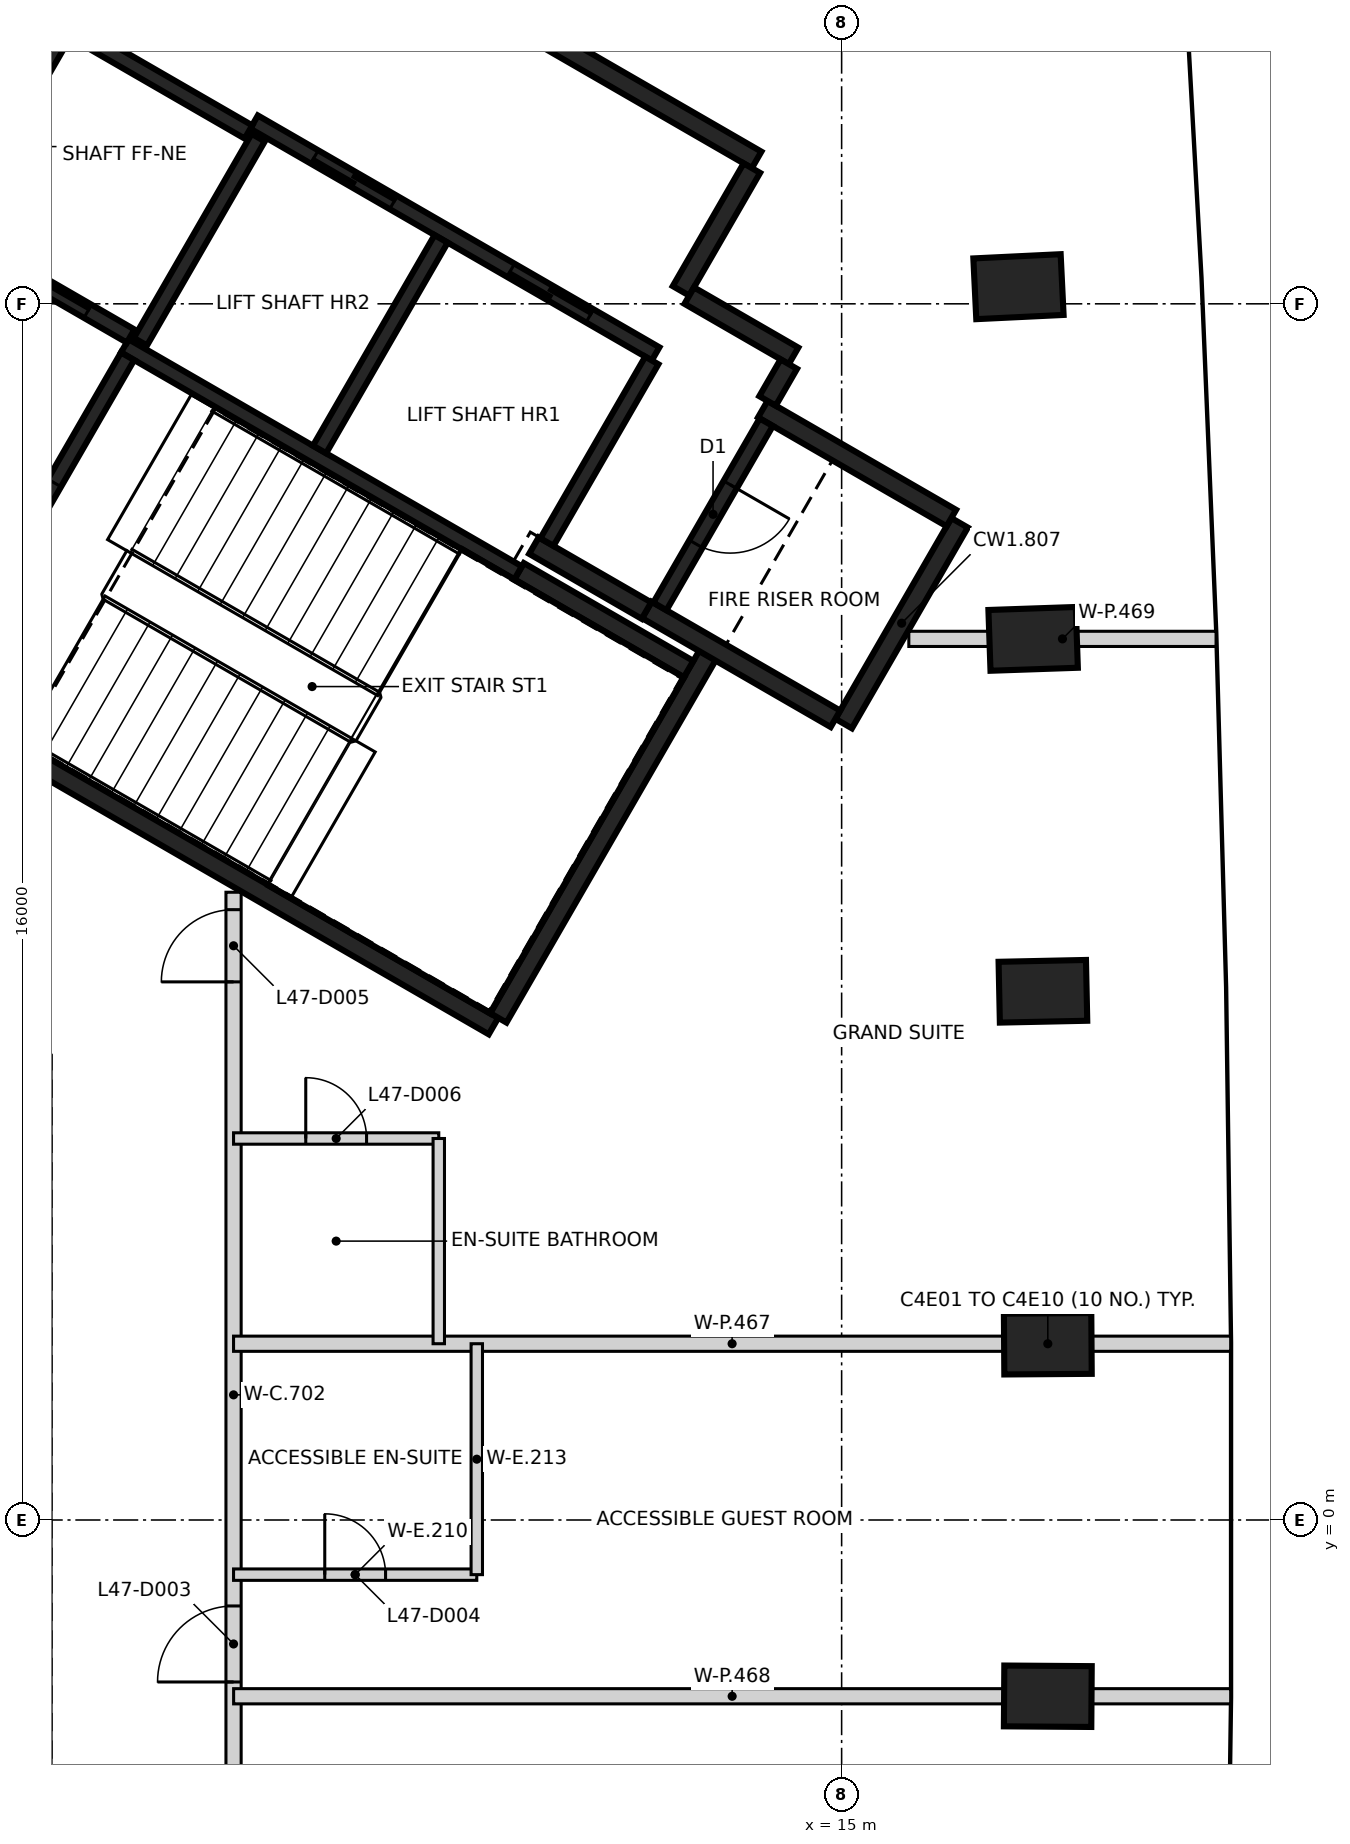
"""IFC4 building model, lengths in metres.
Left out: names, types, materials, properties, quantities, classifications, styles, units other than length and angle.
Written with IfcOpenShell. Run it as: python <this file> out.ifc"""

import sys

from ifc_helpers import new_model, si_unit, direction, frame, frame_2d, origin, origin_2d, place, context, subcontext, project, spatial, rectangle, extrude, element, fill, save


model = new_model("IFC4")
c1 = context("Model", 3, precision=1e-05, world=origin(), true_north=direction((0.0, 1.0)))
c2 = subcontext(c1, "Body", "Model", "MODEL_VIEW")
j1 = project(units=[si_unit("LENGTHUNIT", "METRE"), si_unit("PLANEANGLEUNIT", "RADIAN")], contexts=[c1])
p1 = place(None, origin())
s1 = spatial("IfcSite", under=j1, at=p1, CompositionType="ELEMENT")
p2 = place(p1, origin())
s2 = spatial("IfcBuilding", under=s1, at=p2, CompositionType="ELEMENT")
p3 = place(p2, frame((0.0, 0.0, 190.0)))
s3 = spatial("IfcBuildingStorey", under=s2, at=p3, CompositionType="ELEMENT", Elevation=190.0)
for number, where, z_axis, x_axis in (
    (1, (17.712, -2.319, -0.35), (0.0, 0.0, 1.0), (-1.0, 0.007, 0.0)),
    (2, (17.712, 2.319, -0.35), (0.0, 0.0, 1.0), (1.0, 0.007, 0.0)),
    (3, (17.648, 6.956, -0.35), (0.0, 0.0, 1.0), (1.0, 0.021, 0.0)),
    (4, (17.519, 11.592, -0.35), (0.0, 0.0, 1.0), (0.999, 0.034, 0.0)),
    (5, (17.326, 16.226, -0.35), (0.0, 0.0, 1.0), (0.999, 0.048, 0.0)),
):
    element("IfcColumn", number, at=place(p3, frame(where, z_axis=z_axis, x_axis=x_axis)), inside=s3, PredefinedType="COLUMN", context=c2, shape_type="SweptSolid", body=[
        extrude(rectangle(XDim=1.15, YDim=0.8, at=origin_2d()), origin(), (0.0, 0.0, 1.0), 3.6),
    ])
p4 = place(p3, frame((10.42, 6.498, 0.0), z_axis=(0.0, 0.0, 1.0), x_axis=(-0.866021906294, 0.500006057782, 0.0)))
e6 = element("IfcWall", 6, at=p4, inside=s3, PredefinedType="SHEAR", context=c2, shape_type="SweptSolid", body=[
    extrude(rectangle(XDim=11.55, YDim=0.25, at=frame_2d((5.775, 0.0))), origin(), (0.0, 0.0, 1.0), 3.25),
])
p5 = place(p4, frame((10.025, 0.0, 0.0)))
e7 = element("IfcOpeningElement", 7, at=p5, cuts=e6, PredefinedType="OPENING", context=c2, shape_type="SweptSolid", body=[
    extrude(rectangle(XDim=1.2, YDim=2.1, at=frame_2d((0.6, 1.05))), frame((0.0, 0.135, 0.0), z_axis=(0.0, -1.0, 0.0), x_axis=(1.0, 0.0, 0.0)), (0.0, 0.0, 1.0), 0.27),
])
p6 = place(p4, frame((8.725, 0.0, 0.0)))
e8 = element("IfcOpeningElement", 8, at=p6, cuts=e6, PredefinedType="OPENING", context=c2, shape_type="SweptSolid", body=[
    extrude(rectangle(XDim=1.2, YDim=2.1, at=frame_2d((0.6, 1.05))), frame((0.0, 0.135, 0.0), z_axis=(0.0, -1.0, 0.0), x_axis=(1.0, 0.0, 0.0)), (0.0, 0.0, 1.0), 0.27),
])
p7 = place(p3, frame((6.304, 22.269, 0.0), z_axis=(0.0, 0.0, 1.0), x_axis=(0.866022959057, -0.500004234368, 0.0)))
e9 = element("IfcWall", 9, at=p7, inside=s3, PredefinedType="SHEAR", context=c2, shape_type="SweptSolid", body=[
    extrude(rectangle(XDim=8.75, YDim=0.25, at=frame_2d((4.375, 0.0))), origin(), (0.0, 0.0, 1.0), 3.25),
])
p8 = place(p3, frame((3.179, 16.856, 0.0), z_axis=(0.0, 0.0, 1.0), x_axis=(0.500001955336, 0.866024274868, 0.0)))
e10 = element("IfcWall", 10, at=p8, inside=s3, PredefinedType="SHEAR", context=c2, shape_type="SweptSolid", body=[
    extrude(rectangle(XDim=6.125, YDim=0.25, at=frame_2d((3.062, 0.0))), origin(), (0.0, 0.0, 1.0), 3.25),
])
p9 = place(p8, frame((3.563, 0.0, 0.0)))
e11 = element("IfcOpeningElement", 11, at=p9, cuts=e10, PredefinedType="OPENING", context=c2, shape_type="SweptSolid", body=[
    extrude(rectangle(XDim=1.0, YDim=2.1, at=frame_2d((0.5, 1.05))), frame((0.0, 0.135, 0.0), z_axis=(0.0, -1.0, 0.0), x_axis=(1.0, 0.0, 0.0)), (0.0, 0.0, 1.0), 0.27),
])
p10 = place(p3, frame((13.238, 11.378, 0.0), z_axis=(0.0, 0.0, 1.0), x_axis=(-0.500008851346, -0.866020293397, 0.0)))
e12 = element("IfcWall", 12, at=p10, inside=s3, PredefinedType="SHEAR", context=c2, shape_type="SweptSolid", body=[
    extrude(rectangle(XDim=5.51, YDim=0.25, at=frame_2d((2.755, 0.0))), origin(), (0.0, 0.0, 1.0), 3.25),
])
p11 = place(p3, frame((16.552, 13.119, 0.0), z_axis=(0.0, 0.0, 1.0), x_axis=(-0.499978833458, -0.866037623948, 0.0)))
e13 = element("IfcWall", 13, at=p11, inside=s3, PredefinedType="SHEAR", context=c2, shape_type="SweptSolid", body=[
    extrude(rectangle(XDim=3.05, YDim=0.25, at=frame_2d((1.525, 0.0))), origin(), (0.0, 0.0, 1.0), 3.25),
])
p12 = place(p3, frame((14.918, 10.54, 0.0), z_axis=(0.0, 0.0, 1.0), x_axis=(-0.866063538972, 0.499933942099, 0.0)))
e14 = element("IfcWall", 14, at=p12, inside=s3, PredefinedType="SHEAR", context=c2, shape_type="SweptSolid", body=[
    extrude(rectangle(XDim=2.865, YDim=0.25, at=frame_2d((1.432, 0.0))), origin(), (0.0, 0.0, 1.0), 3.25),
])
p13 = place(p3, frame((13.963, 14.614, 0.0), z_axis=(0.0, 0.0, 1.0), x_axis=(0.866042235819, -0.499970844928, 0.0)))
e15 = element("IfcWall", 15, at=p13, inside=s3, PredefinedType="SHEAR", context=c2, shape_type="SweptSolid", body=[
    extrude(rectangle(XDim=2.865, YDim=0.25, at=frame_2d((1.432, 0.0))), origin(), (0.0, 0.0, 1.0), 3.25),
])
p14 = place(p3, frame((10.757, 12.481, 0.0), z_axis=(0.0, 0.0, 1.0), x_axis=(0.866022940537, -0.500004266446, 0.0)))
e16 = element("IfcWall", 16, at=p14, inside=s3, PredefinedType="SHEAR", context=c2, shape_type="SweptSolid", body=[
    extrude(rectangle(XDim=2.575, YDim=0.25, at=frame_2d((1.287, 0.0))), origin(), (0.0, 0.0, 1.0), 3.25),
])
p15 = place(p3, frame((13.819, 17.785, 0.0), z_axis=(0.0, 0.0, 1.0), x_axis=(-0.500039802285, -0.866002422705, 0.0)))
e17 = element("IfcWall", 17, at=p15, inside=s3, PredefinedType="SHEAR", context=c2, shape_type="SweptSolid", body=[
    extrude(rectangle(XDim=1.865, YDim=0.25, at=frame_2d((0.932, 0.0))), origin(), (0.0, 0.0, 1.0), 3.25),
])
p16 = place(p3, frame((12.433, 11.964, 0.0), z_axis=(0.0, 0.0, 1.0), x_axis=(-0.866038183914, 0.499977863513, 0.0)))
e18 = element("IfcWall", 18, at=p16, inside=s3, PredefinedType="SHEAR", context=c2, shape_type="SweptSolid", body=[
    extrude(rectangle(XDim=1.71, YDim=0.25, at=frame_2d((0.855, 0.0))), origin(), (0.0, 0.0, 1.0), 3.25),
])
p17 = place(p3, frame((12.995, 16.108, 0.0), z_axis=(0.0, 0.0, 1.0), x_axis=(0.866044474677, -0.49996696679, 0.0)))
e19 = element("IfcWall", 19, at=p17, inside=s3, PredefinedType="SHEAR", context=c2, shape_type="SweptSolid", body=[
    extrude(rectangle(XDim=1.584, YDim=0.25, at=frame_2d((0.792, 0.0))), origin(), (0.0, 0.0, 1.0), 3.25),
])
p18 = place(p3, frame((14.305, 15.207, 0.0), z_axis=(0.0, 0.0, 1.0), x_axis=(-0.499848422343, -0.866112899501, 0.0)))
e20 = element("IfcWall", 20, at=p18, inside=s3, PredefinedType="SHEAR", context=c2, shape_type="SweptSolid", body=[
    extrude(rectangle(XDim=0.559, YDim=0.25, at=frame_2d((0.28, 0.0))), origin(), (0.0, 0.0, 1.0), 3.25),
])
p19 = place(p3, frame((12.552, 15.342, 0.0), z_axis=(0.0, 0.0, 1.0), x_axis=(-0.866030299012, 0.499991521122, 0.0)))
e21 = element("IfcWall", 21, at=p19, inside=s3, PredefinedType="SHEAR", context=c2, shape_type="SweptSolid", body=[
    extrude(rectangle(XDim=6.1, YDim=0.2, at=frame_2d((3.05, 0.0))), origin(), (0.0, 0.0, 1.0), 3.25),
])
p20 = place(p19, frame((1.0, 0.0, 0.0)))
e22 = element("IfcOpeningElement", 22, at=p20, cuts=e21, PredefinedType="OPENING", context=c2, shape_type="SweptSolid", body=[
    extrude(rectangle(XDim=1.2, YDim=2.1, at=frame_2d((0.6, 1.05))), frame((0.0, 0.11, 0.0), z_axis=(0.0, -1.0, 0.0), x_axis=(1.0, 0.0, 0.0)), (0.0, 0.0, 1.0), 0.22),
])
p21 = place(p19, frame((3.982, 0.0, 0.0)))
e23 = element("IfcOpeningElement", 23, at=p21, cuts=e21, PredefinedType="OPENING", context=c2, shape_type="SweptSolid", body=[
    extrude(rectangle(XDim=1.2, YDim=2.1, at=frame_2d((0.6, 1.05))), frame((0.0, 0.11, 0.0), z_axis=(0.0, -1.0, 0.0), x_axis=(1.0, 0.0, 0.0)), (0.0, 0.0, 1.0), 0.22),
])
p22 = place(p3, frame((10.743, 12.46, 0.0), z_axis=(0.0, 0.0, 1.0), x_axis=(-0.866018848283, 0.500011354289, 0.0)))
e24 = element("IfcWall", 24, at=p22, inside=s3, PredefinedType="SHEAR", context=c2, shape_type="SweptSolid", body=[
    extrude(rectangle(XDim=5.974, YDim=0.2, at=frame_2d((2.987, 0.0))), origin(), (0.0, 0.0, 1.0), 3.25),
])
p23 = place(p3, frame((3.057, 10.895, 0.0), z_axis=(0.0, 0.0, 1.0), x_axis=(0.500027839223, 0.866009330205, 0.0)))
e25 = element("IfcWall", 25, at=p23, inside=s3, PredefinedType="SHEAR", context=c2, shape_type="SweptSolid", body=[
    extrude(rectangle(XDim=5.098, YDim=0.2, at=frame_2d((2.549, 0.0))), origin(), (0.0, 0.0, 1.0), 3.25),
])
p24 = place(p23, frame((1.774, 0.0, 0.0)))
e26 = element("IfcOpeningElement", 26, at=p24, cuts=e25, PredefinedType="OPENING", context=c2, shape_type="SweptSolid", body=[
    extrude(rectangle(XDim=1.4, YDim=2.1, at=frame_2d((0.7, 1.05))), frame((0.0, 0.11, 0.0), z_axis=(0.0, -1.0, 0.0), x_axis=(1.0, 0.0, 0.0)), (0.0, 0.0, 1.0), 0.22),
])
p25 = place(p3, frame((8.132, 14.084, 0.0), z_axis=(0.0, 0.0, 1.0), x_axis=(0.500030834389, 0.86600760081, 0.0)))
e27 = element("IfcWall", 27, at=p25, inside=s3, PredefinedType="SHEAR", context=c2, shape_type="SweptSolid", body=[
    extrude(rectangle(XDim=3.198, YDim=0.2, at=frame_2d((1.599, 0.0))), origin(), (0.0, 0.0, 1.0), 3.25),
])
p26 = place(p3, frame((14.008, 14.442, 0.0), z_axis=(0.0, 0.0, 1.0), x_axis=(-0.499986818241, -0.866033014143, 0.0)))
e28 = element("IfcWall", 28, at=p26, inside=s3, PredefinedType="SHEAR", context=c2, shape_type="SweptSolid", body=[
    extrude(rectangle(XDim=2.798, YDim=0.2, at=frame_2d((1.399, 0.0))), origin(), (0.0, 0.0, 1.0), 3.25),
])
p27 = place(p26, frame((0.949, 0.0, 0.0)))
e29 = element("IfcOpeningElement", 29, at=p27, cuts=e28, PredefinedType="OPENING", context=c2, shape_type="SweptSolid", body=[
    extrude(rectangle(XDim=0.9, YDim=2.1, at=frame_2d((0.45, 1.05))), frame((0.0, 0.11, 0.0), z_axis=(0.0, -1.0, 0.0), x_axis=(1.0, 0.0, 0.0)), (0.0, 0.0, 1.0), 0.22),
])
p28 = place(p3, frame((12.502, 15.255, 0.0), z_axis=(0.0, 0.0, 1.0), x_axis=(-0.499965018551, -0.866045599391, 0.0)))
e30 = element("IfcWall", 30, at=p28, inside=s3, PredefinedType="SHEAR", context=c2, shape_type="SweptSolid", body=[
    extrude(rectangle(XDim=2.759, YDim=0.2, at=frame_2d((1.379, 0.0))), origin(), (0.0, 0.0, 1.0), 3.25),
])
p29 = place(p3, frame((7.324, 18.187, 0.0), z_axis=(0.0, 0.0, 1.0), x_axis=(-0.499967891604, -0.866043940782, 0.0)))
e31 = element("IfcWall", 31, at=p29, inside=s3, PredefinedType="SHEAR", context=c2, shape_type="SweptSolid", body=[
    extrude(rectangle(XDim=3.1, YDim=0.2, at=frame_2d((1.55, 0.0))), origin(), (0.0, 0.0, 1.0), 3.25),
])
p30 = place(p3, frame((5.646, 15.576, 0.0), z_axis=(0.0, 0.0, 1.0), x_axis=(-0.866018407898, 0.500012117035, 0.0)))
e32 = element("IfcWall", 32, at=p30, inside=s3, PredefinedType="SHEAR", context=c2, shape_type="SweptSolid", body=[
    extrude(rectangle(XDim=2.651, YDim=0.2, at=frame_2d((1.325, 0.0))), origin(), (0.0, 0.0, 1.0), 3.25),
])
p31 = place(p30, frame((0.652, 0.0, 0.0)))
e33 = element("IfcOpeningElement", 33, at=p31, cuts=e32, PredefinedType="OPENING", context=c2, shape_type="SweptSolid", body=[
    extrude(rectangle(XDim=1.3, YDim=2.1, at=frame_2d((0.65, 1.05))), frame((0.0, 0.11, 0.0), z_axis=(0.0, -1.0, 0.0), x_axis=(1.0, 0.0, 0.0)), (0.0, 0.0, 1.0), 0.22),
])
p32 = place(p3, frame((7.196, 18.26, 0.0), z_axis=(0.0, 0.0, 1.0), x_axis=(-0.866018407898, 0.500012117035, 0.0)))
e34 = element("IfcWall", 34, at=p32, inside=s3, PredefinedType="SHEAR", context=c2, shape_type="SweptSolid", body=[
    extrude(rectangle(XDim=2.651, YDim=0.2, at=frame_2d((1.325, 0.0))), origin(), (0.0, 0.0, 1.0), 3.25),
])
p33 = place(p3, frame((7.0, -4.966, 0.0), z_axis=(0.0, 0.0, 1.0), x_axis=(0.0, 1.0, 0.0)))
e35 = element("IfcWall", 35, at=p33, inside=s3, PredefinedType="PARTITIONING", context=c2, shape_type="SweptSolid", body=[
    extrude(rectangle(XDim=13.225, YDim=0.2, at=frame_2d((6.612, 0.0))), origin(), (0.0, 0.0, 1.0), 3.25),
])
p34 = place(p33, frame((2.835, 0.0, 0.0)))
e36 = element("IfcOpeningElement", 36, at=p34, cuts=e35, PredefinedType="OPENING", context=c2, shape_type="SweptSolid", body=[
    extrude(rectangle(XDim=1.0, YDim=2.1, at=frame_2d((0.5, 1.05))), frame((0.0, 0.11, 0.0), z_axis=(0.0, -1.0, 0.0), x_axis=(1.0, 0.0, 0.0)), (0.0, 0.0, 1.0), 0.22),
])
p35 = place(p33, frame((12.045, 0.0, 0.0)))
e37 = element("IfcOpeningElement", 37, at=p35, cuts=e35, PredefinedType="OPENING", context=c2, shape_type="SweptSolid", body=[
    extrude(rectangle(XDim=0.95, YDim=2.1, at=frame_2d((0.475, 1.05))), frame((0.0, 0.11, 0.0), z_axis=(0.0, -1.0, 0.0), x_axis=(1.0, 0.0, 0.0)), (0.0, 0.0, 1.0), 0.22),
])
p36 = place(p3, frame((7.0, 2.319, 0.0), z_axis=(0.0, 0.0, 1.0), x_axis=(1.0, 0.0, 0.0)))
e38 = element("IfcWall", 38, at=p36, inside=s3, PredefinedType="PARTITIONING", context=c2, shape_type="SweptSolid", body=[
    extrude(rectangle(XDim=13.118, YDim=0.2, at=frame_2d((6.559, 0.0))), origin(), (0.0, 0.0, 1.0), 3.25),
])
p37 = place(p3, frame((7.001, -2.319, 0.0), z_axis=(0.0, 0.0, 1.0), x_axis=(1.0, 0.0, 0.0)))
e39 = element("IfcWall", 39, at=p37, inside=s3, PredefinedType="PARTITIONING", context=c2, shape_type="SweptSolid", body=[
    extrude(rectangle(XDim=13.117, YDim=0.2, at=frame_2d((6.559, 0.0))), origin(), (0.0, 0.0, 1.0), 3.25),
])
p38 = place(p3, frame((15.884, 11.592, 0.0), z_axis=(0.0, 0.0, 1.0), x_axis=(1.0, 0.0, 0.0)))
e40 = element("IfcWall", 40, at=p38, inside=s3, PredefinedType="PARTITIONING", context=c2, shape_type="SweptSolid", body=[
    extrude(rectangle(XDim=4.042, YDim=0.2, at=frame_2d((2.021, 0.0))), origin(), (0.0, 0.0, 1.0), 3.25),
])
p39 = place(p3, frame((7.0, -0.719, 0.0), z_axis=(0.0, 0.0, 1.0), x_axis=(1.0, 0.0, 0.0)))
e41 = element("IfcWall", 41, at=p39, inside=s3, PredefinedType="PARTITIONING", context=c2, shape_type="SweptSolid", body=[
    extrude(rectangle(XDim=3.2, YDim=0.15, at=frame_2d((1.6, 0.0))), origin(), (0.0, 0.0, 1.0), 3.25),
])
p40 = place(p39, frame((1.2, 0.0, 0.0)))
e42 = element("IfcOpeningElement", 42, at=p40, cuts=e41, PredefinedType="OPENING", context=c2, shape_type="SweptSolid", body=[
    extrude(rectangle(XDim=0.8, YDim=2.1, at=frame_2d((0.4, 1.05))), frame((0.0, 0.085, 0.0), z_axis=(0.0, -1.0, 0.0), x_axis=(1.0, 0.0, 0.0)), (0.0, 0.0, 1.0), 0.17),
])
p41 = place(p3, frame((7.0, 5.019, 0.0), z_axis=(0.0, 0.0, 1.0), x_axis=(1.0, 0.0, 0.0)))
e43 = element("IfcWall", 43, at=p41, inside=s3, PredefinedType="PARTITIONING", context=c2, shape_type="SweptSolid", body=[
    extrude(rectangle(XDim=2.7, YDim=0.15, at=frame_2d((1.35, 0.0))), origin(), (0.0, 0.0, 1.0), 3.25),
])
p42 = place(p41, frame((0.95, 0.0, 0.0)))
e44 = element("IfcOpeningElement", 44, at=p42, cuts=e43, PredefinedType="OPENING", context=c2, shape_type="SweptSolid", body=[
    extrude(rectangle(XDim=0.8, YDim=2.1, at=frame_2d((0.4, 1.05))), frame((0.0, 0.085, 0.0), z_axis=(0.0, -1.0, 0.0), x_axis=(1.0, 0.0, 0.0)), (0.0, 0.0, 1.0), 0.17),
])
p43 = place(p3, frame((9.7, 2.319, 0.0), z_axis=(0.0, 0.0, 1.0), x_axis=(0.0, 1.0, 0.0)))
e45 = element("IfcWall", 45, at=p43, inside=s3, PredefinedType="PARTITIONING", context=c2, shape_type="SweptSolid", body=[
    extrude(rectangle(XDim=2.7, YDim=0.15, at=frame_2d((1.35, 0.0))), origin(), (0.0, 0.0, 1.0), 3.25),
])
p44 = place(p3, frame((10.2, -0.719, 0.0), z_axis=(0.0, 0.0, 1.0), x_axis=(0.0, 1.0, 0.0)))
e46 = element("IfcWall", 46, at=p44, inside=s3, PredefinedType="PARTITIONING", context=c2, shape_type="SweptSolid", body=[
    extrude(rectangle(XDim=3.038, YDim=0.15, at=frame_2d((1.519, 0.0))), origin(), (0.0, 0.0, 1.0), 3.25),
])
p45 = place(p31, origin())
e47 = element("IfcDoor", 47, at=p45, inside=s3, OperationType="SLIDING_TO_RIGHT", PredefinedType="DOOR", context=c2, shape_type="SweptSolid", body=[
    extrude(rectangle(XDim=1.3, YDim=2.1, at=frame_2d((0.65, 1.05))), frame((0.0, 0.025, 0.0), z_axis=(0.0, -1.0, 0.0), x_axis=(1.0, 0.0, 0.0)), (0.0, 0.0, 1.0), 0.05),
])
fill(e33, e47)
p46 = place(p20, origin())
e48 = element("IfcDoor", 48, at=p46, inside=s3, OperationType="DOUBLE_DOOR_SLIDING", PredefinedType="DOOR", context=c2, shape_type="SweptSolid", body=[
    extrude(rectangle(XDim=1.2, YDim=2.1, at=frame_2d((0.6, 1.05))), frame((0.0, 0.025, 0.0), z_axis=(0.0, -1.0, 0.0), x_axis=(1.0, 0.0, 0.0)), (0.0, 0.0, 1.0), 0.05),
])
fill(e22, e48)
p47 = place(p21, origin())
e49 = element("IfcDoor", 49, at=p47, inside=s3, OperationType="DOUBLE_DOOR_SLIDING", PredefinedType="DOOR", context=c2, shape_type="SweptSolid", body=[
    extrude(rectangle(XDim=1.2, YDim=2.1, at=frame_2d((0.6, 1.05))), frame((0.0, 0.025, 0.0), z_axis=(0.0, -1.0, 0.0), x_axis=(1.0, 0.0, 0.0)), (0.0, 0.0, 1.0), 0.05),
])
fill(e23, e49)
p48 = place(p24, origin())
e50 = element("IfcDoor", 50, at=p48, inside=s3, OperationType="SINGLE_SWING_RIGHT", PredefinedType="DOOR", context=c2, shape_type="SweptSolid", body=[
    extrude(rectangle(XDim=1.4, YDim=2.1, at=frame_2d((0.7, 1.05))), frame((0.0, 0.025, 0.0), z_axis=(0.0, -1.0, 0.0), x_axis=(1.0, 0.0, 0.0)), (0.0, 0.0, 1.0), 0.05),
])
fill(e26, e50)
p49 = place(p27, origin())
e51 = element("IfcDoor", 51, at=p49, inside=s3, OperationType="SINGLE_SWING_LEFT", PredefinedType="DOOR", context=c2, shape_type="SweptSolid", body=[
    extrude(rectangle(XDim=0.9, YDim=2.1, at=frame_2d((0.45, 1.05))), frame((0.0, 0.025, 0.0), z_axis=(0.0, -1.0, 0.0), x_axis=(1.0, 0.0, 0.0)), (0.0, 0.0, 1.0), 0.05),
])
fill(e29, e51)
p50 = place(p34, frame((1.0, 0.0, 0.0), z_axis=(0.0, 0.0, 1.0), x_axis=(-1.0, 0.0, 0.0)))
e52 = element("IfcDoor", 52, at=p50, inside=s3, OperationType="SINGLE_SWING_LEFT", PredefinedType="DOOR", context=c2, shape_type="SweptSolid", body=[
    extrude(rectangle(XDim=1.0, YDim=2.1, at=frame_2d((0.5, 1.05))), frame((0.0, 0.025, 0.0), z_axis=(0.0, -1.0, 0.0), x_axis=(1.0, 0.0, 0.0)), (0.0, 0.0, 1.0), 0.05),
])
fill(e36, e52)
p51 = place(p40, origin())
e53 = element("IfcDoor", 53, at=p51, inside=s3, OperationType="SINGLE_SWING_LEFT", PredefinedType="DOOR", context=c2, shape_type="SweptSolid", body=[
    extrude(rectangle(XDim=0.8, YDim=2.1, at=frame_2d((0.4, 1.05))), frame((0.0, 0.025, 0.0), z_axis=(0.0, -1.0, 0.0), x_axis=(1.0, 0.0, 0.0)), (0.0, 0.0, 1.0), 0.05),
])
fill(e42, e53)
p52 = place(p35, frame((0.95, 0.0, 0.0), z_axis=(0.0, 0.0, 1.0), x_axis=(-1.0, 0.0, 0.0)))
e54 = element("IfcDoor", 54, at=p52, inside=s3, OperationType="SINGLE_SWING_LEFT", PredefinedType="DOOR", context=c2, shape_type="SweptSolid", body=[
    extrude(rectangle(XDim=0.95, YDim=2.1, at=frame_2d((0.475, 1.05))), frame((0.0, 0.025, 0.0), z_axis=(0.0, -1.0, 0.0), x_axis=(1.0, 0.0, 0.0)), (0.0, 0.0, 1.0), 0.05),
])
fill(e37, e54)
p53 = place(p42, origin())
e55 = element("IfcDoor", 55, at=p53, inside=s3, OperationType="SINGLE_SWING_LEFT", PredefinedType="DOOR", context=c2, shape_type="SweptSolid", body=[
    extrude(rectangle(XDim=0.8, YDim=2.1, at=frame_2d((0.4, 1.05))), frame((0.0, 0.025, 0.0), z_axis=(0.0, -1.0, 0.0), x_axis=(1.0, 0.0, 0.0)), (0.0, 0.0, 1.0), 0.05),
])
fill(e44, e55)
save(model, sys.argv[1])
